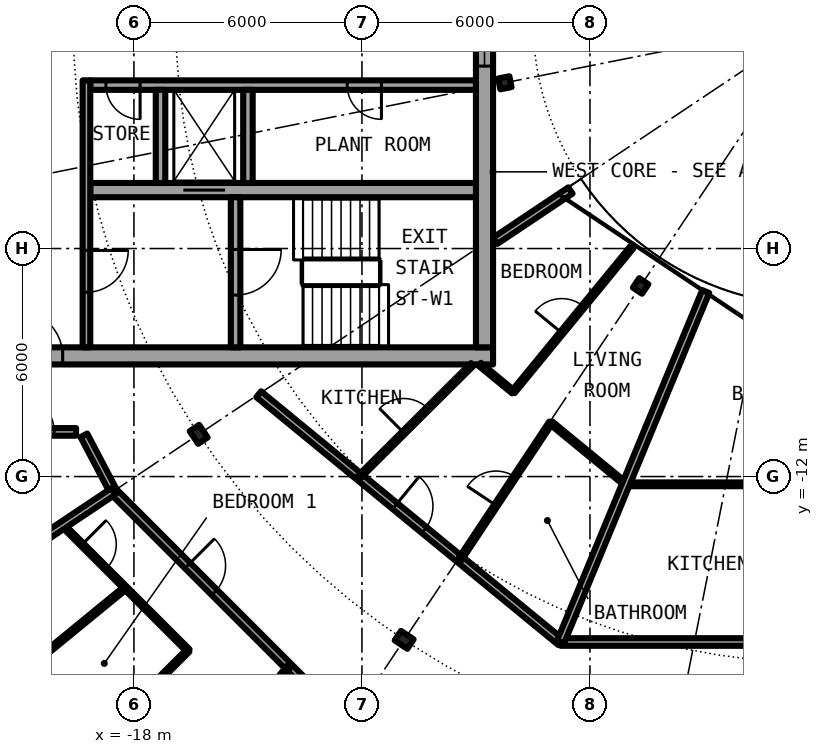
"""IFC4 building model, lengths in metres.
Left out: names, types, materials, properties, quantities, classifications, styles, units other than length and angle.
Written with IfcOpenShell. Run it as: python <this file> out.ifc"""

import sys

from ifc_helpers import new_model, si_unit, direction, frame, frame_2d, origin, origin_2d, place, context, subcontext, project, spatial, rectangle, i_section, extrude, element, fill, save


model = new_model("IFC4")
c1 = context("Model", 3, precision=1e-05, world=origin(), true_north=direction((0.0, 1.0)))
c2 = subcontext(c1, "Body", "Model", "MODEL_VIEW")
j1 = project(units=[si_unit("LENGTHUNIT", "METRE"), si_unit("PLANEANGLEUNIT", "RADIAN")], contexts=[c1])
p1 = place(None, origin())
s1 = spatial("IfcSite", under=j1, at=p1, CompositionType="ELEMENT")
p2 = place(p1, origin())
s2 = spatial("IfcBuilding", under=s1, at=p2, CompositionType="ELEMENT")
p3 = place(p2, frame((0.0, 0.0, 199.35)))
s3 = spatial("IfcBuildingStorey", under=s2, at=p3, CompositionType="ELEMENT", Elevation=199.35)
for number, where, z_axis, x_axis in (
    (1, (-16.297, -10.889, 0.0), (0.0, 0.0, 1.0), (-0.831, -0.556, 0.0)),
    (2, (-10.889, -16.297, 0.0), (0.0, 0.0, 1.0), (-0.556, -0.831, 0.0)),
):
    element("IfcColumn", number, at=place(p3, frame(where, z_axis=z_axis, x_axis=x_axis)), inside=s3, PredefinedType="COLUMN", context=c2, shape_type="SweptSolid", body=[
        extrude(i_section(OverallWidth=0.3, OverallDepth=0.4, WebThickness=0.013, FlangeThickness=0.024, FilletRadius=0.027, at=origin_2d()), origin(), (0.0, 0.0, 1.0), 3.05),
    ])
for number, where, z_axis, x_axis in (
    (3, (-8.239, -1.639, 0.0), (0.0, 0.0, 1.0), (-0.981, -0.195, 0.0)),
    (4, (-4.667, -6.984, 0.0), (0.0, 0.0, 1.0), (-0.556, -0.831, 0.0)),
):
    element("IfcColumn", number, at=place(p3, frame(where, z_axis=z_axis, x_axis=x_axis)), inside=s3, PredefinedType="COLUMN", context=c2, shape_type="SweptSolid", body=[
        extrude(i_section(OverallWidth=0.3, OverallDepth=0.29, WebThickness=0.009, FlangeThickness=0.014, FilletRadius=0.027, at=origin_2d()), origin(), (0.0, 0.0, 1.0), 3.05),
    ])
p4 = place(p3, frame((-22.699, -15.167, 0.0), z_axis=(0.0, 0.0, 1.0), x_axis=(0.634382322723, -0.773019449054, 0.0)))
e5 = element("IfcWall", 5, at=p4, inside=s3, PredefinedType="SOLIDWALL", context=c2, shape_type="SweptSolid", body=[
    extrude(rectangle(XDim=5.352, YDim=0.25, at=frame_2d((2.676, 0.0))), origin(), (0.0, 0.0, 1.0), 2.7),
])
p5 = place(p4, frame((0.441, 0.0, 0.3)))
e6 = element("IfcOpeningElement", 6, at=p5, cuts=e5, PredefinedType="OPENING", context=c2, shape_type="SweptSolid", body=[
    extrude(rectangle(XDim=1.8, YDim=2.1, at=frame_2d((0.9, 1.05))), frame((0.0, 0.135, 0.0), z_axis=(0.0, -1.0, 0.0), x_axis=(1.0, 0.0, 0.0)), (0.0, 0.0, 1.0), 0.27),
])
p6 = place(p4, frame((3.51, 0.0, 0.0)))
e7 = element("IfcOpeningElement", 7, at=p6, cuts=e5, PredefinedType="OPENING", context=c2, shape_type="SweptSolid", body=[
    extrude(rectangle(XDim=1.0, YDim=2.2, at=frame_2d((0.5, 1.1))), frame((0.0, 0.135, 0.0), z_axis=(0.0, -1.0, 0.0), x_axis=(1.0, 0.0, 0.0)), (0.0, 0.0, 1.0), 0.27),
])
p7 = place(p3, frame((-22.05, -8.825, 0.0), z_axis=(0.0, 0.0, 1.0), x_axis=(1.0, 0.0, 0.0)))
e8 = element("IfcWall", 8, at=p7, inside=s3, PredefinedType="SHEAR", context=c2, shape_type="SweptSolid", body=[
    extrude(rectangle(XDim=13.5, YDim=0.45, at=frame_2d((6.75, 0.0))), origin(), (0.0, 0.0, 1.0), 3.05),
])
p8 = place(p7, frame((0.975, 0.0, 0.0)))
e9 = element("IfcOpeningElement", 9, at=p8, cuts=e8, PredefinedType="OPENING", context=c2, shape_type="SweptSolid", body=[
    extrude(rectangle(XDim=1.2, YDim=2.3, at=frame_2d((0.6, 1.15))), frame((0.0, 0.235, 0.0), z_axis=(0.0, -1.0, 0.0), x_axis=(1.0, 0.0, 0.0)), (0.0, 0.0, 1.0), 0.47),
])
p9 = place(p3, frame((-8.775, 8.6, 0.0), z_axis=(0.0, 0.0, 1.0), x_axis=(0.0, -1.0, 0.0)))
e10 = element("IfcWall", 10, at=p9, inside=s3, PredefinedType="SHEAR", context=c2, shape_type="SweptSolid", body=[
    extrude(rectangle(XDim=17.2, YDim=0.45, at=frame_2d((8.6, 0.0))), origin(), (0.0, 0.0, 1.0), 3.05),
])
p10 = place(p9, frame((7.4, 0.0, 0.1)))
e11 = element("IfcOpeningElement", 11, at=p10, cuts=e10, PredefinedType="OPENING", context=c2, shape_type="SweptSolid", body=[
    extrude(rectangle(XDim=2.4, YDim=2.2, at=frame_2d((1.2, 1.1))), frame((0.0, 0.235, 0.0), z_axis=(0.0, -1.0, 0.0), x_axis=(1.0, 0.0, 0.0)), (0.0, 0.0, 1.0), 0.47),
])
p11 = place(p3, frame((-9.0, -1.7, 0.0), z_axis=(0.0, 0.0, 1.0), x_axis=(-1.0, 0.0, 0.0)))
e12 = element("IfcWall", 12, at=p11, inside=s3, PredefinedType="SHEAR", context=c2, shape_type="SweptSolid", body=[
    extrude(rectangle(XDim=10.15, YDim=0.25, at=frame_2d((5.075, 0.0))), origin(), (0.0, 0.0, 1.0), 3.05),
])
p12 = place(p11, frame((2.488, 0.0, 0.0)))
e13 = element("IfcOpeningElement", 13, at=p12, cuts=e12, PredefinedType="OPENING", context=c2, shape_type="SweptSolid", body=[
    extrude(rectangle(XDim=0.9, YDim=2.3, at=frame_2d((0.45, 1.15))), frame((0.0, 0.135, 0.0), z_axis=(0.0, -1.0, 0.0), x_axis=(1.0, 0.0, 0.0)), (0.0, 0.0, 1.0), 0.27),
])
p13 = place(p11, frame((8.837, 0.0, 0.0)))
e14 = element("IfcOpeningElement", 14, at=p13, cuts=e12, PredefinedType="OPENING", context=c2, shape_type="SweptSolid", body=[
    extrude(rectangle(XDim=0.9, YDim=2.3, at=frame_2d((0.45, 1.15))), frame((0.0, 0.135, 0.0), z_axis=(0.0, -1.0, 0.0), x_axis=(1.0, 0.0, 0.0)), (0.0, 0.0, 1.0), 0.27),
])
p14 = place(p3, frame((-9.0, -4.462, 0.0), z_axis=(0.0, 0.0, 1.0), x_axis=(-1.0, 0.0, 0.0)))
e15 = element("IfcWall", 15, at=p14, inside=s3, PredefinedType="SHEAR", context=c2, shape_type="SweptSolid", body=[
    extrude(rectangle(XDim=10.15, YDim=0.375, at=frame_2d((5.075, 0.0))), origin(), (0.0, 0.0, 1.0), 3.05),
])
p15 = place(p14, frame((6.6, 0.0, 0.0)))
e16 = element("IfcOpeningElement", 16, at=p15, cuts=e15, PredefinedType="OPENING", context=c2, shape_type="SweptSolid", body=[
    extrude(rectangle(XDim=1.1, YDim=2.3, at=frame_2d((0.55, 1.15))), frame((0.0, 0.198, 0.0), z_axis=(0.0, -1.0, 0.0), x_axis=(1.0, 0.0, 0.0)), (0.0, 0.0, 1.0), 0.395),
])
p16 = place(p3, frame((-15.325, -4.65, 0.0), z_axis=(0.0, 0.0, 1.0), x_axis=(0.0, -1.0, 0.0)))
e17 = element("IfcWall", 17, at=p16, inside=s3, PredefinedType="SHEAR", context=c2, shape_type="SweptSolid", body=[
    extrude(rectangle(XDim=3.95, YDim=0.25, at=frame_2d((1.975, 0.0))), origin(), (0.0, 0.0, 1.0), 3.05),
])
p17 = place(p16, frame((1.375, 0.0, 0.0)))
e18 = element("IfcOpeningElement", 18, at=p17, cuts=e17, PredefinedType="OPENING", context=c2, shape_type="SweptSolid", body=[
    extrude(rectangle(XDim=1.2, YDim=2.3, at=frame_2d((0.6, 1.15))), frame((0.0, 0.135, 0.0), z_axis=(0.0, -1.0, 0.0), x_axis=(1.0, 0.0, 0.0)), (0.0, 0.0, 1.0), 0.27),
])
for number, where, z_axis, x_axis in (
    (19, (-15.0, -1.825, 0.0), (0.0, 0.0, 1.0), (0.0, -1.0, 0.0)),
    (20, (-17.3, -1.825, 0.0), (0.0, 0.0, 1.0), (0.0, -1.0, 0.0)),
):
    element("IfcWall", number, at=place(p3, frame(where, z_axis=z_axis, x_axis=x_axis)), inside=s3, PredefinedType="SOLIDWALL", context=c2, shape_type="SweptSolid", body=[
        extrude(rectangle(XDim=2.45, YDim=0.25, at=frame_2d((1.225, 0.0))), origin(), (0.0, 0.0, 1.0), 2.7),
    ])
p18 = place(p3, frame((-19.25, -1.575, 0.0), z_axis=(0.0, 0.0, 1.0), x_axis=(0.0, -1.0, 0.0)))
e21 = element("IfcWall", 21, at=p18, inside=s3, PredefinedType="SOLIDWALL", context=c2, shape_type="SweptSolid", body=[
    extrude(rectangle(XDim=7.025, YDim=0.2, at=frame_2d((3.513, 0.0))), origin(), (0.0, 0.0, 1.0), 2.7),
])
p19 = place(p18, frame((4.475, 0.0, 0.0)))
e22 = element("IfcOpeningElement", 22, at=p19, cuts=e21, PredefinedType="OPENING", context=c2, shape_type="SweptSolid", body=[
    extrude(rectangle(XDim=1.1, YDim=2.3, at=frame_2d((0.55, 1.15))), frame((0.0, 0.11, 0.0), z_axis=(0.0, -1.0, 0.0), x_axis=(1.0, 0.0, 0.0)), (0.0, 0.0, 1.0), 0.22),
])
p20 = place(p3, frame((-19.869, -13.285, 0.0), z_axis=(0.0, 0.0, 1.0), x_axis=(0.707290020325, -0.706923494552, 0.0)))
e23 = element("IfcWall", 23, at=p20, inside=s3, PredefinedType="PARTITIONING", context=c2, shape_type="SweptSolid", body=[
    extrude(rectangle(XDim=4.663, YDim=0.1, at=frame_2d((2.331, 0.0))), origin(), (0.0, 0.0, 1.0), 2.7),
])
p21 = place(p20, frame((0.712, 0.0, 0.0)))
e24 = element("IfcOpeningElement", 24, at=p21, cuts=e23, PredefinedType="OPENING", context=c2, shape_type="SweptSolid", body=[
    extrude(rectangle(XDim=0.9, YDim=2.3, at=frame_2d((0.45, 1.15))), frame((0.0, 0.06, 0.0), z_axis=(0.0, -1.0, 0.0), x_axis=(1.0, 0.0, 0.0)), (0.0, 0.0, 1.0), 0.12),
])
p22 = place(p3, frame((-19.317, -10.915, 0.0), z_axis=(0.0, 0.0, 1.0), x_axis=(0.465359652486, -0.885121683068, 0.0)))
e25 = element("IfcWall", 25, at=p22, inside=s3, PredefinedType="PARTITIONING", context=c2, shape_type="SweptSolid", body=[
    extrude(rectangle(XDim=1.665, YDim=0.2, at=frame_2d((0.833, 0.0))), origin(), (0.0, 0.0, 1.0), 2.7),
])
p23 = place(p3, frame((-18.542, -12.389, 0.0), z_axis=(0.0, 0.0, 1.0), x_axis=(0.707106781187, -0.707106781187, 0.0)))
e26 = element("IfcWall", 26, at=p23, inside=s3, PredefinedType="PARTITIONING", context=c2, shape_type="SweptSolid", body=[
    extrude(rectangle(XDim=8.702, YDim=0.2, at=frame_2d((4.351, 0.0))), origin(), (0.0, 0.0, 1.0), 2.7),
])
p24 = place(p23, frame((2.763, 0.0, 0.0)))
e27 = element("IfcOpeningElement", 27, at=p24, cuts=e26, PredefinedType="OPENING", context=c2, shape_type="SweptSolid", body=[
    extrude(rectangle(XDim=1.0, YDim=2.3, at=frame_2d((0.5, 1.15))), frame((0.0, 0.11, 0.0), z_axis=(0.0, -1.0, 0.0), x_axis=(1.0, 0.0, 0.0)), (0.0, 0.0, 1.0), 0.22),
])
p25 = place(p3, frame((-14.717, -9.834, 0.0), z_axis=(0.0, 0.0, 1.0), x_axis=(0.773034536097, -0.634363938131, 0.0)))
e28 = element("IfcWall", 28, at=p25, inside=s3, PredefinedType="PARTITIONING", context=c2, shape_type="SweptSolid", body=[
    extrude(rectangle(XDim=10.277, YDim=0.2, at=frame_2d((5.138, 0.0))), origin(), (0.0, 0.0, 1.0), 2.7),
])
p26 = place(p25, frame((4.638, 0.0, 0.0)))
e29 = element("IfcOpeningElement", 29, at=p26, cuts=e28, PredefinedType="OPENING", context=c2, shape_type="SweptSolid", body=[
    extrude(rectangle(XDim=1.0, YDim=2.3, at=frame_2d((0.5, 1.15))), frame((0.0, 0.11, 0.0), z_axis=(0.0, -1.0, 0.0), x_axis=(1.0, 0.0, 0.0)), (0.0, 0.0, 1.0), 0.22),
])
p27 = place(p3, frame((-6.773, -16.353, 0.0), z_axis=(0.0, 0.0, 1.0), x_axis=(1.0, 0.0, 0.0)))
e30 = element("IfcWall", 30, at=p27, inside=s3, PredefinedType="PARTITIONING", context=c2, shape_type="SweptSolid", body=[
    extrude(rectangle(XDim=13.546, YDim=0.2, at=frame_2d((6.773, 0.0))), origin(), (0.0, 0.0, 1.0), 2.7),
])
p28 = place(p27, frame((7.966, 0.0, 0.0)))
e31 = element("IfcOpeningElement", 31, at=p28, cuts=e30, PredefinedType="OPENING", context=c2, shape_type="SweptSolid", body=[
    extrude(rectangle(XDim=1.0, YDim=2.3, at=frame_2d((0.5, 1.15))), frame((0.0, 0.11, 0.0), z_axis=(0.0, -1.0, 0.0), x_axis=(1.0, 0.0, 0.0)), (0.0, 0.0, 1.0), 0.22),
])
p29 = place(p3, frame((-8.901, -9.047, 0.0), z_axis=(0.0, 0.0, 1.0), x_axis=(0.772786083133, -0.634666581534, 0.0)))
e32 = element("IfcWall", 32, at=p29, inside=s3, PredefinedType="PARTITIONING", context=c2, shape_type="SweptSolid", body=[
    extrude(rectangle(XDim=1.144, YDim=0.1, at=frame_2d((0.572, 0.0))), origin(), (0.0, 0.0, 1.0), 2.7),
])
p30 = place(p3, frame((-7.031, -10.582, 0.0), z_axis=(0.0, 0.0, 1.0), x_axis=(0.772943675046, -0.634474645046, 0.0)))
e33 = element("IfcWall", 33, at=p30, inside=s3, PredefinedType="PARTITIONING", context=c2, shape_type="SweptSolid", body=[
    extrude(rectangle(XDim=2.557, YDim=0.1, at=frame_2d((1.278, 0.0))), origin(), (0.0, 0.0, 1.0), 2.7),
])
p31 = place(p3, frame((-5.055, -12.204, 0.0), z_axis=(0.0, 0.0, 1.0), x_axis=(1.0, 0.0, 0.0)))
e34 = element("IfcWall", 34, at=p31, inside=s3, PredefinedType="PARTITIONING", context=c2, shape_type="SweptSolid", body=[
    extrude(rectangle(XDim=6.319, YDim=0.1, at=frame_2d((3.159, 0.0))), origin(), (0.0, 0.0, 1.0), 2.7),
])
p32 = place(p3, frame((-21.675, -10.825, 0.0), z_axis=(0.0, 0.0, 1.0), x_axis=(1.0, 0.0, 0.0)))
e35 = element("IfcWall", 35, at=p32, inside=s3, PredefinedType="PARTITIONING", context=c2, shape_type="SweptSolid", body=[
    extrude(rectangle(XDim=2.152, YDim=0.2, at=frame_2d((1.076, 0.0))), origin(), (0.0, 0.0, 1.0), 2.7),
])
p33 = place(p32, frame((0.576, 0.0, 0.0)))
e36 = element("IfcOpeningElement", 36, at=p33, cuts=e35, PredefinedType="OPENING", context=c2, shape_type="SweptSolid", body=[
    extrude(rectangle(XDim=1.0, YDim=2.3, at=frame_2d((0.5, 1.15))), frame((0.0, 0.11, 0.0), z_axis=(0.0, -1.0, 0.0), x_axis=(1.0, 0.0, 0.0)), (0.0, 0.0, 1.0), 0.22),
])
p34 = place(p3, frame((-6.513, -4.472, 0.0), z_axis=(0.0, 0.0, 1.0), x_axis=(-0.831403409976, -0.555669299026, 0.0)))
e37 = element("IfcWall", 37, at=p34, inside=s3, PredefinedType="PARTITIONING", context=c2, shape_type="SweptSolid", body=[
    extrude(rectangle(XDim=2.383, YDim=0.2, at=frame_2d((1.191, 0.0))), origin(), (0.0, 0.0, 1.0), 2.7),
])
p35 = place(p3, frame((-14.927, -18.224, 0.0), z_axis=(0.0, 0.0, 1.0), x_axis=(0.633861186344, 0.773446828454, 0.0)))
e38 = element("IfcWall", 38, at=p35, inside=s3, PredefinedType="PARTITIONING", context=c2, shape_type="SweptSolid", body=[
    extrude(rectangle(XDim=1.578, YDim=0.1, at=frame_2d((0.789, 0.0))), origin(), (0.0, 0.0, 1.0), 2.7),
])
p36 = place(p3, frame((-22.595, -15.098, 0.0), z_axis=(0.0, 0.0, 1.0), x_axis=(0.831387096605, 0.55569370664, 0.0)))
e39 = element("IfcWall", 39, at=p36, inside=s3, PredefinedType="PARTITIONING", context=c2, shape_type="SweptSolid", body=[
    extrude(rectangle(XDim=4.875, YDim=0.2, at=frame_2d((2.438, 0.0))), origin(), (0.0, 0.0, 1.0), 2.7),
])
p37 = place(p3, frame((-21.023, -17.22, 0.0), z_axis=(0.0, 0.0, 1.0), x_axis=(0.773548271597, 0.633737383709, 0.0)))
e40 = element("IfcWall", 40, at=p37, inside=s3, PredefinedType="PARTITIONING", context=c2, shape_type="SweptSolid", body=[
    extrude(rectangle(XDim=3.618, YDim=0.1, at=frame_2d((1.809, 0.0))), origin(), (0.0, 0.0, 1.0), 2.7),
])
p38 = place(p3, frame((-19.216, -19.216, 0.0), z_axis=(0.0, 0.0, 1.0), x_axis=(0.707106781187, 0.707106781187, 0.0)))
e41 = element("IfcWall", 41, at=p38, inside=s3, PredefinedType="PARTITIONING", context=c2, shape_type="SweptSolid", body=[
    extrude(rectangle(XDim=3.735, YDim=0.1, at=frame_2d((1.868, 0.0))), origin(), (0.0, 0.0, 1.0), 2.7),
])
p39 = place(p38, frame((1.417, 0.0, 0.0)))
e42 = element("IfcOpeningElement", 42, at=p39, cuts=e41, PredefinedType="OPENING", context=c2, shape_type="SweptSolid", body=[
    extrude(rectangle(XDim=0.9, YDim=2.3, at=frame_2d((0.45, 1.15))), frame((0.0, 0.06, 0.0), z_axis=(0.0, -1.0, 0.0), x_axis=(1.0, 0.0, 0.0)), (0.0, 0.0, 1.0), 0.12),
])
p40 = place(p3, frame((-12.069, -12.007, 0.0), z_axis=(0.0, 0.0, 1.0), x_axis=(0.708909651863, 0.705299302067, 0.0)))
e43 = element("IfcWall", 43, at=p40, inside=s3, PredefinedType="PARTITIONING", context=c2, shape_type="SweptSolid", body=[
    extrude(rectangle(XDim=4.193, YDim=0.1, at=frame_2d((2.096, 0.0))), origin(), (0.0, 0.0, 1.0), 2.7),
])
p41 = place(p40, frame((1.646, 0.0, 0.0)))
e44 = element("IfcOpeningElement", 44, at=p41, cuts=e43, PredefinedType="OPENING", context=c2, shape_type="SweptSolid", body=[
    extrude(rectangle(XDim=0.9, YDim=2.3, at=frame_2d((0.45, 1.15))), frame((0.0, 0.06, 0.0), z_axis=(0.0, -1.0, 0.0), x_axis=(1.0, 0.0, 0.0)), (0.0, 0.0, 1.0), 0.12),
])
p42 = place(p3, frame((-9.421, -14.18, 0.0), z_axis=(0.0, 0.0, 1.0), x_axis=(0.553303732327, 0.832979579457, 0.0)))
e45 = element("IfcWall", 45, at=p42, inside=s3, PredefinedType="PARTITIONING", context=c2, shape_type="SweptSolid", body=[
    extrude(rectangle(XDim=4.319, YDim=0.1, at=frame_2d((2.16, 0.0))), origin(), (0.0, 0.0, 1.0), 2.7),
])
p43 = place(p42, frame((1.71, 0.0, 0.0)))
e46 = element("IfcOpeningElement", 46, at=p43, cuts=e45, PredefinedType="OPENING", context=c2, shape_type="SweptSolid", body=[
    extrude(rectangle(XDim=0.9, YDim=2.3, at=frame_2d((0.45, 1.15))), frame((0.0, 0.06, 0.0), z_axis=(0.0, -1.0, 0.0), x_axis=(1.0, 0.0, 0.0)), (0.0, 0.0, 1.0), 0.12),
])
p44 = place(p3, frame((-8.019, -9.771, 0.0), z_axis=(0.0, 0.0, 1.0), x_axis=(0.634401778971, 0.773003481776, 0.0)))
e47 = element("IfcWall", 47, at=p44, inside=s3, PredefinedType="PARTITIONING", context=c2, shape_type="SweptSolid", body=[
    extrude(rectangle(XDim=4.92, YDim=0.1, at=frame_2d((2.46, 0.0))), origin(), (0.0, 0.0, 1.0), 2.7),
])
p45 = place(p44, frame((2.01, 0.0, 0.0)))
e48 = element("IfcOpeningElement", 48, at=p45, cuts=e47, PredefinedType="OPENING", context=c2, shape_type="SweptSolid", body=[
    extrude(rectangle(XDim=0.9, YDim=2.3, at=frame_2d((0.45, 1.15))), frame((0.0, 0.06, 0.0), z_axis=(0.0, -1.0, 0.0), x_axis=(1.0, 0.0, 0.0)), (0.0, 0.0, 1.0), 0.12),
])
p46 = place(p3, frame((-6.774, -16.353, 0.0), z_axis=(0.0, 0.0, 1.0), x_axis=(0.382716169203, 0.92386597179, 0.0)))
e49 = element("IfcWall", 49, at=p46, inside=s3, PredefinedType="PARTITIONING", context=c2, shape_type="SweptSolid", body=[
    extrude(rectangle(XDim=9.981, YDim=0.2, at=frame_2d((4.99, 0.0))), origin(), (0.0, 0.0, 1.0), 2.7),
])
p47 = place(p15, origin())
e50 = element("IfcDoor", 50, at=p47, inside=s3, OperationType="DOUBLE_DOOR_SLIDING", PredefinedType="DOOR", context=c2, shape_type="SweptSolid", body=[
    extrude(rectangle(XDim=1.1, YDim=2.3, at=frame_2d((0.55, 1.15))), frame((0.0, 0.025, 0.0), z_axis=(0.0, -1.0, 0.0), x_axis=(1.0, 0.0, 0.0)), (0.0, 0.0, 1.0), 0.05),
])
fill(e16, e50)
p48 = place(p12, origin())
e51 = element("IfcDoor", 51, at=p48, inside=s3, OperationType="SINGLE_SWING_RIGHT", PredefinedType="DOOR", context=c2, shape_type="SweptSolid", body=[
    extrude(rectangle(XDim=0.9, YDim=2.3, at=frame_2d((0.45, 1.15))), frame((0.0, 0.025, 0.0), z_axis=(0.0, -1.0, 0.0), x_axis=(1.0, 0.0, 0.0)), (0.0, 0.0, 1.0), 0.05),
])
fill(e13, e51)
p49 = place(p13, origin())
e52 = element("IfcDoor", 52, at=p49, inside=s3, OperationType="SINGLE_SWING_LEFT", PredefinedType="DOOR", context=c2, shape_type="SweptSolid", body=[
    extrude(rectangle(XDim=0.9, YDim=2.3, at=frame_2d((0.45, 1.15))), frame((0.0, 0.025, 0.0), z_axis=(0.0, -1.0, 0.0), x_axis=(1.0, 0.0, 0.0)), (0.0, 0.0, 1.0), 0.05),
])
fill(e14, e52)
p50 = place(p17, origin())
e53 = element("IfcDoor", 53, at=p50, inside=s3, OperationType="SINGLE_SWING_LEFT", PredefinedType="DOOR", context=c2, shape_type="SweptSolid", body=[
    extrude(rectangle(XDim=1.2, YDim=2.3, at=frame_2d((0.6, 1.15))), frame((0.0, 0.025, 0.0), z_axis=(0.0, -1.0, 0.0), x_axis=(1.0, 0.0, 0.0)), (0.0, 0.0, 1.0), 0.05),
])
fill(e18, e53)
p51 = place(p19, origin())
e54 = element("IfcDoor", 54, at=p51, inside=s3, OperationType="SINGLE_SWING_LEFT", PredefinedType="DOOR", context=c2, shape_type="SweptSolid", body=[
    extrude(rectangle(XDim=1.1, YDim=2.3, at=frame_2d((0.55, 1.15))), frame((0.0, 0.025, 0.0), z_axis=(0.0, -1.0, 0.0), x_axis=(1.0, 0.0, 0.0)), (0.0, 0.0, 1.0), 0.05),
])
fill(e22, e54)
p52 = place(p8, origin())
e55 = element("IfcDoor", 55, at=p52, inside=s3, OperationType="SINGLE_SWING_RIGHT", PredefinedType="DOOR", context=c2, shape_type="SweptSolid", body=[
    extrude(rectangle(XDim=1.2, YDim=2.3, at=frame_2d((0.6, 1.15))), frame((0.0, 0.025, 0.0), z_axis=(0.0, -1.0, 0.0), x_axis=(1.0, 0.0, 0.0)), (0.0, 0.0, 1.0), 0.05),
])
fill(e9, e55)
p53 = place(p10, origin())
e56 = element("IfcWindow", 56, at=p53, inside=s3, PartitioningType="SINGLE_PANEL", PredefinedType="WINDOW", context=c2, shape_type="SweptSolid", body=[
    extrude(rectangle(XDim=2.4, YDim=2.2, at=frame_2d((1.2, 1.1))), frame((0.0, 0.03, 0.0), z_axis=(0.0, -1.0, 0.0), x_axis=(1.0, 0.0, 0.0)), (0.0, 0.0, 1.0), 0.06),
])
fill(e11, e56)
p54 = place(p24, origin())
e57 = element("IfcDoor", 57, at=p54, inside=s3, OperationType="SINGLE_SWING_LEFT", PredefinedType="DOOR", context=c2, shape_type="SweptSolid", body=[
    extrude(rectangle(XDim=1.0, YDim=2.3, at=frame_2d((0.5, 1.15))), frame((0.0, 0.025, 0.0), z_axis=(0.0, -1.0, 0.0), x_axis=(1.0, 0.0, 0.0)), (0.0, 0.0, 1.0), 0.05),
])
fill(e27, e57)
p55 = place(p21, origin())
e58 = element("IfcDoor", 58, at=p55, inside=s3, OperationType="SINGLE_SWING_LEFT", PredefinedType="DOOR", context=c2, shape_type="SweptSolid", body=[
    extrude(rectangle(XDim=0.9, YDim=2.3, at=frame_2d((0.45, 1.15))), frame((0.0, 0.025, 0.0), z_axis=(0.0, -1.0, 0.0), x_axis=(1.0, 0.0, 0.0)), (0.0, 0.0, 1.0), 0.05),
])
fill(e24, e58)
p56 = place(p26, origin())
e59 = element("IfcDoor", 59, at=p56, inside=s3, OperationType="SINGLE_SWING_LEFT", PredefinedType="DOOR", context=c2, shape_type="SweptSolid", body=[
    extrude(rectangle(XDim=1.0, YDim=2.3, at=frame_2d((0.5, 1.15))), frame((0.0, 0.025, 0.0), z_axis=(0.0, -1.0, 0.0), x_axis=(1.0, 0.0, 0.0)), (0.0, 0.0, 1.0), 0.05),
])
fill(e29, e59)
p57 = place(p43, origin())
e60 = element("IfcDoor", 60, at=p57, inside=s3, OperationType="SINGLE_SWING_RIGHT", PredefinedType="DOOR", context=c2, shape_type="SweptSolid", body=[
    extrude(rectangle(XDim=0.9, YDim=2.3, at=frame_2d((0.45, 1.15))), frame((0.0, 0.025, 0.0), z_axis=(0.0, -1.0, 0.0), x_axis=(1.0, 0.0, 0.0)), (0.0, 0.0, 1.0), 0.05),
])
fill(e46, e60)
p58 = place(p41, origin())
e61 = element("IfcDoor", 61, at=p58, inside=s3, OperationType="SINGLE_SWING_LEFT", PredefinedType="DOOR", context=c2, shape_type="SweptSolid", body=[
    extrude(rectangle(XDim=0.9, YDim=2.3, at=frame_2d((0.45, 1.15))), frame((0.0, 0.025, 0.0), z_axis=(0.0, -1.0, 0.0), x_axis=(1.0, 0.0, 0.0)), (0.0, 0.0, 1.0), 0.05),
])
fill(e44, e61)
p59 = place(p45, origin())
e62 = element("IfcDoor", 62, at=p59, inside=s3, OperationType="SINGLE_SWING_LEFT", PredefinedType="DOOR", context=c2, shape_type="SweptSolid", body=[
    extrude(rectangle(XDim=0.9, YDim=2.3, at=frame_2d((0.45, 1.15))), frame((0.0, 0.025, 0.0), z_axis=(0.0, -1.0, 0.0), x_axis=(1.0, 0.0, 0.0)), (0.0, 0.0, 1.0), 0.05),
])
fill(e48, e62)
p60 = place(p33, origin())
e63 = element("IfcDoor", 63, at=p60, inside=s3, OperationType="SINGLE_SWING_LEFT", PredefinedType="DOOR", context=c2, shape_type="SweptSolid", body=[
    extrude(rectangle(XDim=1.0, YDim=2.3, at=frame_2d((0.5, 1.15))), frame((0.0, 0.025, 0.0), z_axis=(0.0, -1.0, 0.0), x_axis=(1.0, 0.0, 0.0)), (0.0, 0.0, 1.0), 0.05),
])
fill(e36, e63)
save(model, sys.argv[1])
